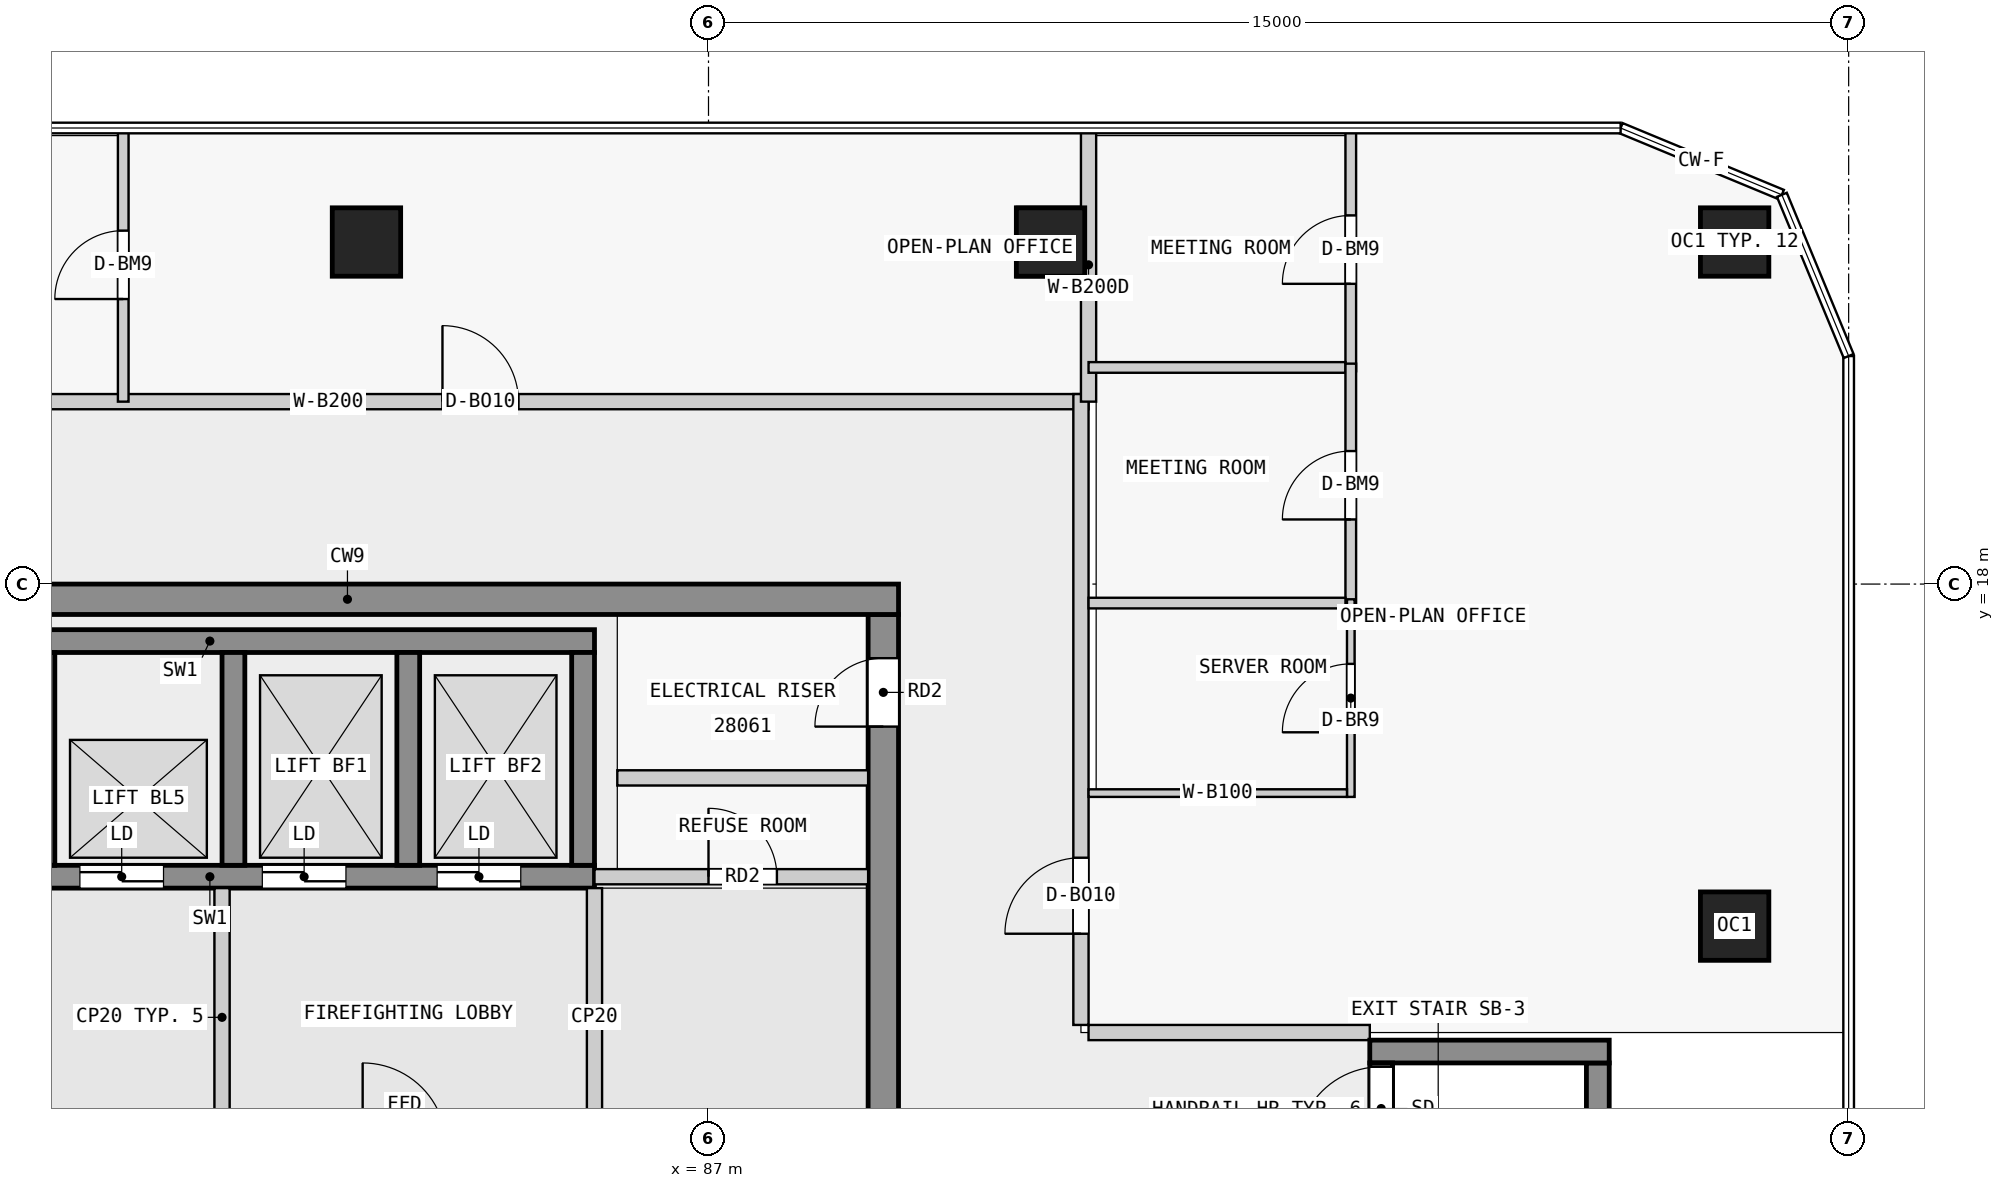
"""IFC4 building model, lengths in metres.
Left out: names, types, materials, properties, quantities, classifications, styles, units other than length and angle.
Written with IfcOpenShell. Run it as: python <this file> out.ifc"""

import sys

from ifc_helpers import new_model, si_unit, direction, frame, frame_2d, origin, origin_2d, place, context, subcontext, project, spatial, rectangle, extrude, element, fill, save


model = new_model("IFC4")
c1 = context("Model", 3, precision=1e-05, world=origin(), true_north=direction((0.0, 1.0)))
c2 = subcontext(c1, "Body", "Model", "MODEL_VIEW")
j1 = project(units=[si_unit("LENGTHUNIT", "METRE"), si_unit("PLANEANGLEUNIT", "RADIAN")], contexts=[c1])
p1 = place(None, origin())
s1 = spatial("IfcSite", under=j1, at=p1, CompositionType="ELEMENT")
p2 = place(p1, origin())
s2 = spatial("IfcBuilding", under=s1, at=p2, CompositionType="ELEMENT")
p3 = place(p2, frame((0.0, 0.0, 109.8)))
s3 = spatial("IfcBuildingStorey", under=s2, at=p3, CompositionType="ELEMENT", Elevation=109.8)
for number, where, z_axis, x_axis in (
    (1, (100.5, 13.5, 0.0), (0.0, 0.0, 1.0), (1.0, 0.0, 0.0)),
    (2, (100.5, 22.5, 0.0), (0.0, 0.0, 1.0), (1.0, 0.0, 0.0)),
    (3, (91.5, 22.5, 0.0), (0.0, 0.0, 1.0), (1.0, 0.0, 0.0)),
    (4, (82.5, 22.5, 0.0), (0.0, 0.0, 1.0), (1.0, 0.0, 0.0)),
):
    element("IfcColumn", number, at=place(p3, frame(where, z_axis=z_axis, x_axis=x_axis)), inside=s3, PredefinedType="COLUMN", context=c2, shape_type="SweptSolid", body=[
        extrude(rectangle(XDim=0.9, YDim=0.9, at=origin_2d()), origin(), (0.0, 0.0, 1.0), 3.5),
    ])
p4 = place(p3, frame((75.0, 17.8, 0.0), z_axis=(0.0, 0.0, 1.0), x_axis=(1.0, 0.0, 0.0)))
e5 = element("IfcWall", 5, at=p4, inside=s3, PredefinedType="SHEAR", context=c2, shape_type="SweptSolid", body=[
    extrude(rectangle(XDim=14.5, YDim=0.4, at=frame_2d((7.25, 0.0))), origin(), (0.0, 0.0, 1.0), 3.25),
])
p5 = place(p3, frame((89.3, 0.4, 0.0), z_axis=(0.0, 0.0, 1.0), x_axis=(0.0, 1.0, 0.0)))
e6 = element("IfcWall", 6, at=p5, inside=s3, PredefinedType="SHEAR", context=c2, shape_type="SweptSolid", body=[
    extrude(rectangle(XDim=17.2, YDim=0.4, at=frame_2d((8.6, 0.0))), origin(), (0.0, 0.0, 1.0), 3.25),
])
p6 = place(p5, frame((7.7, 0.0, 0.0)))
e7 = element("IfcOpeningElement", 7, at=p6, cuts=e6, PredefinedType="OPENING", context=c2, shape_type="SweptSolid", body=[
    extrude(rectangle(XDim=1.8, YDim=2.1, at=frame_2d((0.9, 1.05))), frame((0.0, 0.21, 0.0), z_axis=(0.0, -1.0, 0.0), x_axis=(1.0, 0.0, 0.0)), (0.0, 0.0, 1.0), 0.42),
])
p7 = place(p5, frame((15.725, 0.0, 0.0)))
e8 = element("IfcOpeningElement", 8, at=p7, cuts=e6, PredefinedType="OPENING", context=c2, shape_type="SweptSolid", body=[
    extrude(rectangle(XDim=0.9, YDim=2.1, at=frame_2d((0.45, 1.05))), frame((0.0, 0.21, 0.0), z_axis=(0.0, -1.0, 0.0), x_axis=(1.0, 0.0, 0.0)), (0.0, 0.0, 1.0), 0.42),
])
p8 = place(p3, frame((75.38, 17.25, 0.0), z_axis=(0.0, 0.0, 1.0), x_axis=(1.0, 0.0, 0.0)))
e9 = element("IfcWall", 9, at=p8, inside=s3, PredefinedType="SHEAR", context=c2, shape_type="SweptSolid", body=[
    extrude(rectangle(XDim=10.12, YDim=0.3, at=frame_2d((5.06, 0.0))), origin(), (0.0, 0.0, 1.0), 3.25),
])
p9 = place(p3, frame((75.38, 14.15, 0.0), z_axis=(0.0, 0.0, 1.0), x_axis=(1.0, 0.0, 0.0)))
e10 = element("IfcWall", 10, at=p9, inside=s3, PredefinedType="SHEAR", context=c2, shape_type="SweptSolid", body=[
    extrude(rectangle(XDim=10.12, YDim=0.3, at=frame_2d((5.06, 0.0))), origin(), (0.0, 0.0, 1.0), 3.25),
])
p10 = place(p9, frame((0.85, 0.0, 0.0)))
e11 = element("IfcOpeningElement", 11, at=p10, cuts=e10, PredefinedType="OPENING", context=c2, shape_type="SweptSolid", body=[
    extrude(rectangle(XDim=1.1, YDim=2.1, at=frame_2d((0.55, 1.05))), frame((0.0, 0.16, 0.0), z_axis=(0.0, -1.0, 0.0), x_axis=(1.0, 0.0, 0.0)), (0.0, 0.0, 1.0), 0.32),
])
p11 = place(p9, frame((3.35, 0.0, 0.0)))
e12 = element("IfcOpeningElement", 12, at=p11, cuts=e10, PredefinedType="OPENING", context=c2, shape_type="SweptSolid", body=[
    extrude(rectangle(XDim=1.1, YDim=2.1, at=frame_2d((0.55, 1.05))), frame((0.0, 0.16, 0.0), z_axis=(0.0, -1.0, 0.0), x_axis=(1.0, 0.0, 0.0)), (0.0, 0.0, 1.0), 0.32),
])
p12 = place(p9, frame((5.75, 0.0, 0.0)))
e13 = element("IfcOpeningElement", 13, at=p12, cuts=e10, PredefinedType="OPENING", context=c2, shape_type="SweptSolid", body=[
    extrude(rectangle(XDim=1.1, YDim=2.1, at=frame_2d((0.55, 1.05))), frame((0.0, 0.16, 0.0), z_axis=(0.0, -1.0, 0.0), x_axis=(1.0, 0.0, 0.0)), (0.0, 0.0, 1.0), 0.32),
])
p13 = place(p9, frame((8.05, 0.0, 0.0)))
e14 = element("IfcOpeningElement", 14, at=p13, cuts=e10, PredefinedType="OPENING", context=c2, shape_type="SweptSolid", body=[
    extrude(rectangle(XDim=1.1, YDim=2.1, at=frame_2d((0.55, 1.05))), frame((0.0, 0.16, 0.0), z_axis=(0.0, -1.0, 0.0), x_axis=(1.0, 0.0, 0.0)), (0.0, 0.0, 1.0), 0.32),
])
for number, where, z_axis, x_axis in (
    (15, (78.25, 14.3, 0.0), (0.0, 0.0, 1.0), (0.0, 1.0, 0.0)),
    (16, (80.75, 14.3, 0.0), (0.0, 0.0, 1.0), (0.0, 1.0, 0.0)),
    (17, (83.05, 14.3, 0.0), (0.0, 0.0, 1.0), (0.0, 1.0, 0.0)),
    (18, (85.35, 14.3, 0.0), (0.0, 0.0, 1.0), (0.0, 1.0, 0.0)),
):
    element("IfcWall", number, at=place(p3, frame(where, z_axis=z_axis, x_axis=x_axis)), inside=s3, PredefinedType="SHEAR", context=c2, shape_type="SweptSolid", body=[
        extrude(rectangle(XDim=2.8, YDim=0.3, at=frame_2d((1.4, 0.0))), origin(), (0.0, 0.0, 1.0), 3.25),
    ])
p14 = place(p3, frame((95.85, 5.3, 0.0), z_axis=(0.0, 0.0, 1.0), x_axis=(0.0, 1.0, 0.0)))
e19 = element("IfcWall", 19, at=p14, inside=s3, PredefinedType="SHEAR", context=c2, shape_type="SweptSolid", body=[
    extrude(rectangle(XDim=6.4, YDim=0.3, at=frame_2d((3.2, 0.0))), origin(), (0.0, 0.0, 1.0), 3.25),
])
p15 = place(p14, frame((5.25, 0.0, 0.0)))
e20 = element("IfcOpeningElement", 20, at=p15, cuts=e19, PredefinedType="OPENING", context=c2, shape_type="SweptSolid", body=[
    extrude(rectangle(XDim=1.1, YDim=2.1, at=frame_2d((0.55, 1.05))), frame((0.0, 0.16, 0.0), z_axis=(0.0, -1.0, 0.0), x_axis=(1.0, 0.0, 0.0)), (0.0, 0.0, 1.0), 0.32),
])
p16 = place(p3, frame((98.7, 5.3, 0.0), z_axis=(0.0, 0.0, 1.0), x_axis=(0.0, 1.0, 0.0)))
e21 = element("IfcWall", 21, at=p16, inside=s3, PredefinedType="SHEAR", context=c2, shape_type="SweptSolid", body=[
    extrude(rectangle(XDim=6.4, YDim=0.3, at=frame_2d((3.2, 0.0))), origin(), (0.0, 0.0, 1.0), 3.25),
])
p17 = place(p3, frame((95.7, 11.85, 0.0), z_axis=(0.0, 0.0, 1.0), x_axis=(1.0, 0.0, 0.0)))
e22 = element("IfcWall", 22, at=p17, inside=s3, PredefinedType="SHEAR", context=c2, shape_type="SweptSolid", body=[
    extrude(rectangle(XDim=3.15, YDim=0.3, at=frame_2d((1.575, 0.0))), origin(), (0.0, 0.0, 1.0), 3.25),
])
for number, where, z_axis, x_axis in (
    (23, (80.6, 10.6, 0.0), (0.0, 0.0, 1.0), (0.0, 1.0, 0.0)),
    (24, (85.5, 10.6, 0.0), (0.0, 0.0, 1.0), (0.0, 1.0, 0.0)),
):
    element("IfcWall", number, at=place(p3, frame(where, z_axis=z_axis, x_axis=x_axis)), inside=s3, PredefinedType="PARTITIONING", context=c2, shape_type="SweptSolid", body=[
        extrude(rectangle(XDim=3.4, YDim=0.2, at=frame_2d((1.7, 0.0))), origin(), (0.0, 0.0, 1.0), 3.25),
    ])
p18 = place(p3, frame((85.5, 14.15, 0.0), z_axis=(0.0, 0.0, 1.0), x_axis=(1.0, 0.0, 0.0)))
e25 = element("IfcWall", 25, at=p18, inside=s3, PredefinedType="PARTITIONING", context=c2, shape_type="SweptSolid", body=[
    extrude(rectangle(XDim=3.6, YDim=0.2, at=frame_2d((1.8, 0.0))), origin(), (0.0, 0.0, 1.0), 3.25),
])
p19 = place(p18, frame((1.5, 0.0, 0.0)))
e26 = element("IfcOpeningElement", 26, at=p19, cuts=e25, PredefinedType="OPENING", context=c2, shape_type="SweptSolid", body=[
    extrude(rectangle(XDim=0.9, YDim=2.1, at=frame_2d((0.45, 1.05))), frame((0.0, 0.11, 0.0), z_axis=(0.0, -1.0, 0.0), x_axis=(1.0, 0.0, 0.0)), (0.0, 0.0, 1.0), 0.22),
])
p20 = place(p3, frame((85.8, 15.45, 0.0), z_axis=(0.0, 0.0, 1.0), x_axis=(1.0, 0.0, 0.0)))
e27 = element("IfcWall", 27, at=p20, inside=s3, PredefinedType="PARTITIONING", context=c2, shape_type="SweptSolid", body=[
    extrude(rectangle(XDim=3.3, YDim=0.2, at=frame_2d((1.65, 0.0))), origin(), (0.0, 0.0, 1.0), 3.25),
])
p21 = place(p3, frame((72.0, 20.4, 0.0), z_axis=(0.0, 0.0, 1.0), x_axis=(1.0, 0.0, 0.0)))
e28 = element("IfcWall", 28, at=p21, inside=s3, PredefinedType="PARTITIONING", context=c2, shape_type="SweptSolid", body=[
    extrude(rectangle(XDim=20.0, YDim=0.2, at=frame_2d((10.0, 0.0))), origin(), (0.0, 0.0, 1.0), 3.25),
])
p22 = place(p21, frame((11.5, 0.0, 0.0)))
e29 = element("IfcOpeningElement", 29, at=p22, cuts=e28, PredefinedType="OPENING", context=c2, shape_type="SweptSolid", body=[
    extrude(rectangle(XDim=1.0, YDim=2.4, at=frame_2d((0.5, 1.2))), frame((0.0, 0.11, 0.0), z_axis=(0.0, -1.0, 0.0), x_axis=(1.0, 0.0, 0.0)), (0.0, 0.0, 1.0), 0.22),
])
p23 = place(p3, frame((91.9, 12.2, 0.0), z_axis=(0.0, 0.0, 1.0), x_axis=(0.0, 1.0, 0.0)))
e30 = element("IfcWall", 30, at=p23, inside=s3, PredefinedType="PARTITIONING", context=c2, shape_type="SweptSolid", body=[
    extrude(rectangle(XDim=8.3, YDim=0.2, at=frame_2d((4.15, 0.0))), origin(), (0.0, 0.0, 1.0), 3.25),
])
p24 = place(p23, frame((1.2, 0.0, 0.0)))
e31 = element("IfcOpeningElement", 31, at=p24, cuts=e30, PredefinedType="OPENING", context=c2, shape_type="SweptSolid", body=[
    extrude(rectangle(XDim=1.0, YDim=2.4, at=frame_2d((0.5, 1.2))), frame((0.0, 0.11, 0.0), z_axis=(0.0, -1.0, 0.0), x_axis=(1.0, 0.0, 0.0)), (0.0, 0.0, 1.0), 0.22),
])
p25 = place(p3, frame((92.0, 12.1, 0.0), z_axis=(0.0, 0.0, 1.0), x_axis=(1.0, 0.0, 0.0)))
e32 = element("IfcWall", 32, at=p25, inside=s3, PredefinedType="PARTITIONING", context=c2, shape_type="SweptSolid", body=[
    extrude(rectangle(XDim=3.7, YDim=0.2, at=frame_2d((1.85, 0.0))), origin(), (0.0, 0.0, 1.0), 3.25),
])
p26 = place(p3, frame((92.0, 20.4, 0.0), z_axis=(0.0, 0.0, 1.0), x_axis=(0.0, 1.0, 0.0)))
e33 = element("IfcWall", 33, at=p26, inside=s3, PredefinedType="PARTITIONING", context=c2, shape_type="SweptSolid", body=[
    extrude(rectangle(XDim=3.6, YDim=0.2, at=frame_2d((1.8, 0.0))), origin(), (0.0, 0.0, 1.0), 3.25),
])
p27 = place(p3, frame((95.45, 20.8, 0.0), z_axis=(0.0, 0.0, 1.0), x_axis=(0.0, 1.0, 0.0)))
e34 = element("IfcWall", 34, at=p27, inside=s3, PredefinedType="PARTITIONING", context=c2, shape_type="SweptSolid", body=[
    extrude(rectangle(XDim=3.2, YDim=0.14, at=frame_2d((1.6, 0.0))), origin(), (0.0, 0.0, 1.0), 3.25),
])
p28 = place(p27, frame((1.15, 0.0, 0.0)))
e35 = element("IfcOpeningElement", 35, at=p28, cuts=e34, PredefinedType="OPENING", context=c2, shape_type="SweptSolid", body=[
    extrude(rectangle(XDim=0.9, YDim=2.4, at=frame_2d((0.45, 1.2))), frame((0.0, 0.08, 0.0), z_axis=(0.0, -1.0, 0.0), x_axis=(1.0, 0.0, 0.0)), (0.0, 0.0, 1.0), 0.16),
])
p29 = place(p3, frame((92.0, 20.85, 0.0), z_axis=(0.0, 0.0, 1.0), x_axis=(1.0, 0.0, 0.0)))
e36 = element("IfcWall", 36, at=p29, inside=s3, PredefinedType="PARTITIONING", context=c2, shape_type="SweptSolid", body=[
    extrude(rectangle(XDim=3.38, YDim=0.14, at=frame_2d((1.69, 0.0))), origin(), (0.0, 0.0, 1.0), 3.25),
])
p30 = place(p3, frame((95.45, 17.7, 0.0), z_axis=(0.0, 0.0, 1.0), x_axis=(0.0, 1.0, 0.0)))
e37 = element("IfcWall", 37, at=p30, inside=s3, PredefinedType="PARTITIONING", context=c2, shape_type="SweptSolid", body=[
    extrude(rectangle(XDim=3.2, YDim=0.14, at=frame_2d((1.6, 0.0))), origin(), (0.0, 0.0, 1.0), 3.25),
])
p31 = place(p30, frame((1.15, 0.0, 0.0)))
e38 = element("IfcOpeningElement", 38, at=p31, cuts=e37, PredefinedType="OPENING", context=c2, shape_type="SweptSolid", body=[
    extrude(rectangle(XDim=0.9, YDim=2.4, at=frame_2d((0.45, 1.2))), frame((0.0, 0.08, 0.0), z_axis=(0.0, -1.0, 0.0), x_axis=(1.0, 0.0, 0.0)), (0.0, 0.0, 1.0), 0.16),
])
p32 = place(p3, frame((92.0, 17.75, 0.0), z_axis=(0.0, 0.0, 1.0), x_axis=(1.0, 0.0, 0.0)))
e39 = element("IfcWall", 39, at=p32, inside=s3, PredefinedType="PARTITIONING", context=c2, shape_type="SweptSolid", body=[
    extrude(rectangle(XDim=3.38, YDim=0.14, at=frame_2d((1.69, 0.0))), origin(), (0.0, 0.0, 1.0), 3.25),
])
p33 = place(p3, frame((95.45, 15.2, 0.0), z_axis=(0.0, 0.0, 1.0), x_axis=(0.0, 1.0, 0.0)))
e40 = element("IfcWall", 40, at=p33, inside=s3, PredefinedType="PARTITIONING", context=c2, shape_type="SweptSolid", body=[
    extrude(rectangle(XDim=2.6, YDim=0.1, at=frame_2d((1.3, 0.0))), origin(), (0.0, 0.0, 1.0), 3.25),
])
p34 = place(p33, frame((0.85, 0.0, 0.0)))
e41 = element("IfcOpeningElement", 41, at=p34, cuts=e40, PredefinedType="OPENING", context=c2, shape_type="SweptSolid", body=[
    extrude(rectangle(XDim=0.9, YDim=2.1, at=frame_2d((0.45, 1.05))), frame((0.0, 0.06, 0.0), z_axis=(0.0, -1.0, 0.0), x_axis=(1.0, 0.0, 0.0)), (0.0, 0.0, 1.0), 0.12),
])
p35 = place(p3, frame((92.0, 15.25, 0.0), z_axis=(0.0, 0.0, 1.0), x_axis=(1.0, 0.0, 0.0)))
e42 = element("IfcWall", 42, at=p35, inside=s3, PredefinedType="PARTITIONING", context=c2, shape_type="SweptSolid", body=[
    extrude(rectangle(XDim=3.4, YDim=0.1, at=frame_2d((1.7, 0.0))), origin(), (0.0, 0.0, 1.0), 3.25),
])
p36 = place(p3, frame((79.3, 20.4, 0.0), z_axis=(0.0, 0.0, 1.0), x_axis=(0.0, 1.0, 0.0)))
e43 = element("IfcWall", 43, at=p36, inside=s3, PredefinedType="PARTITIONING", context=c2, shape_type="SweptSolid", body=[
    extrude(rectangle(XDim=3.6, YDim=0.14, at=frame_2d((1.8, 0.0))), origin(), (0.0, 0.0, 1.0), 3.25),
])
p37 = place(p36, frame((1.35, 0.0, 0.0)))
e44 = element("IfcOpeningElement", 44, at=p37, cuts=e43, PredefinedType="OPENING", context=c2, shape_type="SweptSolid", body=[
    extrude(rectangle(XDim=0.9, YDim=2.4, at=frame_2d((0.45, 1.2))), frame((0.0, 0.08, 0.0), z_axis=(0.0, -1.0, 0.0), x_axis=(1.0, 0.0, 0.0)), (0.0, 0.0, 1.0), 0.16),
])
p38 = place(p11, origin())
e45 = element("IfcDoor", 45, at=p38, inside=s3, OperationType="DOUBLE_DOOR_SLIDING", PredefinedType="DOOR", context=c2, shape_type="SweptSolid", body=[
    extrude(rectangle(XDim=1.1, YDim=2.1, at=frame_2d((0.55, 1.05))), frame((0.0, 0.025, 0.0), z_axis=(0.0, -1.0, 0.0), x_axis=(1.0, 0.0, 0.0)), (0.0, 0.0, 1.0), 0.05),
])
fill(e12, e45)
p39 = place(p12, origin())
e46 = element("IfcDoor", 46, at=p39, inside=s3, OperationType="DOUBLE_DOOR_SLIDING", PredefinedType="DOOR", context=c2, shape_type="SweptSolid", body=[
    extrude(rectangle(XDim=1.1, YDim=2.1, at=frame_2d((0.55, 1.05))), frame((0.0, 0.025, 0.0), z_axis=(0.0, -1.0, 0.0), x_axis=(1.0, 0.0, 0.0)), (0.0, 0.0, 1.0), 0.05),
])
fill(e13, e46)
p40 = place(p13, origin())
e47 = element("IfcDoor", 47, at=p40, inside=s3, OperationType="DOUBLE_DOOR_SLIDING", PredefinedType="DOOR", context=c2, shape_type="SweptSolid", body=[
    extrude(rectangle(XDim=1.1, YDim=2.1, at=frame_2d((0.55, 1.05))), frame((0.0, 0.025, 0.0), z_axis=(0.0, -1.0, 0.0), x_axis=(1.0, 0.0, 0.0)), (0.0, 0.0, 1.0), 0.05),
])
fill(e14, e47)
p41 = place(p15, origin())
e48 = element("IfcDoor", 48, at=p41, inside=s3, OperationType="SINGLE_SWING_LEFT", PredefinedType="DOOR", context=c2, shape_type="SweptSolid", body=[
    extrude(rectangle(XDim=1.1, YDim=2.1, at=frame_2d((0.55, 1.05))), frame((0.0, 0.025, 0.0), z_axis=(0.0, -1.0, 0.0), x_axis=(1.0, 0.0, 0.0)), (0.0, 0.0, 1.0), 0.05),
])
fill(e20, e48)
p42 = place(p19, origin())
e49 = element("IfcDoor", 49, at=p42, inside=s3, OperationType="SINGLE_SWING_LEFT", PredefinedType="DOOR", context=c2, shape_type="SweptSolid", body=[
    extrude(rectangle(XDim=0.9, YDim=2.1, at=frame_2d((0.45, 1.05))), frame((0.0, 0.025, 0.0), z_axis=(0.0, -1.0, 0.0), x_axis=(1.0, 0.0, 0.0)), (0.0, 0.0, 1.0), 0.05),
])
fill(e26, e49)
p43 = place(p7, origin())
e50 = element("IfcDoor", 50, at=p43, inside=s3, OperationType="SINGLE_SWING_LEFT", PredefinedType="DOOR", context=c2, shape_type="SweptSolid", body=[
    extrude(rectangle(XDim=0.9, YDim=2.1, at=frame_2d((0.45, 1.05))), frame((0.0, 0.025, 0.0), z_axis=(0.0, -1.0, 0.0), x_axis=(1.0, 0.0, 0.0)), (0.0, 0.0, 1.0), 0.05),
])
fill(e8, e50)
p44 = place(p24, origin())
e51 = element("IfcDoor", 51, at=p44, inside=s3, OperationType="SINGLE_SWING_LEFT", PredefinedType="DOOR", context=c2, shape_type="SweptSolid", body=[
    extrude(rectangle(XDim=1.0, YDim=2.4, at=frame_2d((0.5, 1.2))), frame((0.0, 0.025, 0.0), z_axis=(0.0, -1.0, 0.0), x_axis=(1.0, 0.0, 0.0)), (0.0, 0.0, 1.0), 0.05),
])
fill(e31, e51)
p45 = place(p22, origin())
e52 = element("IfcDoor", 52, at=p45, inside=s3, OperationType="SINGLE_SWING_LEFT", PredefinedType="DOOR", context=c2, shape_type="SweptSolid", body=[
    extrude(rectangle(XDim=1.0, YDim=2.4, at=frame_2d((0.5, 1.2))), frame((0.0, 0.025, 0.0), z_axis=(0.0, -1.0, 0.0), x_axis=(1.0, 0.0, 0.0)), (0.0, 0.0, 1.0), 0.05),
])
fill(e29, e52)
p46 = place(p28, origin())
e53 = element("IfcDoor", 53, at=p46, inside=s3, OperationType="SINGLE_SWING_LEFT", PredefinedType="DOOR", context=c2, shape_type="SweptSolid", body=[
    extrude(rectangle(XDim=0.9, YDim=2.4, at=frame_2d((0.45, 1.2))), frame((0.0, 0.025, 0.0), z_axis=(0.0, -1.0, 0.0), x_axis=(1.0, 0.0, 0.0)), (0.0, 0.0, 1.0), 0.05),
])
fill(e35, e53)
p47 = place(p31, origin())
e54 = element("IfcDoor", 54, at=p47, inside=s3, OperationType="SINGLE_SWING_LEFT", PredefinedType="DOOR", context=c2, shape_type="SweptSolid", body=[
    extrude(rectangle(XDim=0.9, YDim=2.4, at=frame_2d((0.45, 1.2))), frame((0.0, 0.025, 0.0), z_axis=(0.0, -1.0, 0.0), x_axis=(1.0, 0.0, 0.0)), (0.0, 0.0, 1.0), 0.05),
])
fill(e38, e54)
p48 = place(p34, origin())
e55 = element("IfcDoor", 55, at=p48, inside=s3, OperationType="SINGLE_SWING_LEFT", PredefinedType="DOOR", context=c2, shape_type="SweptSolid", body=[
    extrude(rectangle(XDim=0.9, YDim=2.1, at=frame_2d((0.45, 1.05))), frame((0.0, 0.025, 0.0), z_axis=(0.0, -1.0, 0.0), x_axis=(1.0, 0.0, 0.0)), (0.0, 0.0, 1.0), 0.05),
])
fill(e41, e55)
p49 = place(p37, origin())
e56 = element("IfcDoor", 56, at=p49, inside=s3, OperationType="SINGLE_SWING_LEFT", PredefinedType="DOOR", context=c2, shape_type="SweptSolid", body=[
    extrude(rectangle(XDim=0.9, YDim=2.4, at=frame_2d((0.45, 1.2))), frame((0.0, 0.025, 0.0), z_axis=(0.0, -1.0, 0.0), x_axis=(1.0, 0.0, 0.0)), (0.0, 0.0, 1.0), 0.05),
])
fill(e44, e56)
save(model, sys.argv[1])
